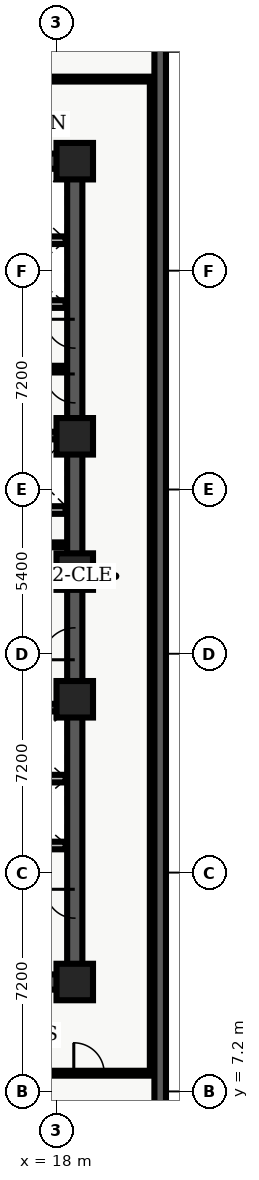
"""IFC4 building model, lengths in metres.
Left out: names, types, materials, properties, quantities, classifications, styles, units other than length and angle.
Written with IfcOpenShell. Run it as: python <this file> out.ifc"""

import sys

from ifc_helpers import new_model, entity, si_unit, converted_unit, direction, frame, origin_with_axes, origin_2d_with_axis, place, context, subcontext, project, spatial, polyline, rectangle, outline, extrude, element, fill, save


model = new_model("IFC4")
c1 = context("Model", 3, precision=1e-05, world=origin_with_axes(), true_north=direction((0.0, 1.0)))
c2 = subcontext(c1, "Body", "Model", "MODEL_VIEW")
j1 = project(units=[si_unit("LENGTHUNIT", "METRE"), converted_unit("PLANEANGLEUNIT", "DEGREE", entity("IfcPlaneAngleMeasure", 0.017), si_unit("PLANEANGLEUNIT", "RADIAN"), dimensions=[0, 0, 0, 0, 0, 0, 0])], contexts=[c1])
p1 = place(None, origin_with_axes())
s1 = spatial("IfcSite", under=j1, at=p1, CompositionType="ELEMENT")
p2 = place(p1, origin_with_axes())
s2 = spatial("IfcBuilding", under=s1, at=p2, CompositionType="ELEMENT")
p3 = place(p2, frame((0.0, 0.0, 93.0), z_axis=(0.0, 0.0, 1.0), x_axis=(1.0, 0.0, 0.0)))
s3 = spatial("IfcBuildingStorey", under=s2, at=p3, CompositionType="ELEMENT", Elevation=93.0)
p4 = place(p3, frame((11.4, 10.8, 0.0), z_axis=(0.0, 0.0, 1.0), x_axis=(1.0, 0.0, 0.0)))
e1 = element("IfcWall", 1, at=p4, inside=s3, PredefinedType="SHEAR", context=c2, shape_type="SweptSolid", body=[
    extrude(outline(polyline([(0.0, -0.25), (7.2, -0.25), (7.2, 0.25), (0.0, 0.25), (0.0, -0.25)])), origin_with_axes(), (0.0, 0.0, 1.0), 3.66),
])
p5 = place(p4, frame((2.625, 0.0, 0.0), z_axis=(0.0, 0.0, 1.0), x_axis=(1.0, 0.0, 0.0)))
e2 = element("IfcOpeningElement", 2, at=p5, cuts=e1, PredefinedType="OPENING", context=c2, shape_type="SweptSolid", body=[
    extrude(rectangle(XDim=1.05, YDim=0.52, at=origin_2d_with_axis()), origin_with_axes(), (0.0, 0.0, 1.0), 2.15),
])
p6 = place(p3, frame((11.4, 37.8, 0.0), z_axis=(0.0, 0.0, 1.0), x_axis=(1.0, 0.0, 0.0)))
e3 = element("IfcWall", 3, at=p6, inside=s3, PredefinedType="SHEAR", context=c2, shape_type="SweptSolid", body=[
    extrude(outline(polyline([(0.0, -0.25), (7.2, -0.25), (7.2, 0.25), (0.0, 0.25), (0.0, -0.25)])), origin_with_axes(), (0.0, 0.0, 1.0), 3.66),
])
p7 = place(p6, frame((2.625, 0.0, 0.0), z_axis=(0.0, 0.0, 1.0), x_axis=(1.0, 0.0, 0.0)))
e4 = element("IfcOpeningElement", 4, at=p7, cuts=e3, PredefinedType="OPENING", context=c2, shape_type="SweptSolid", body=[
    extrude(rectangle(XDim=1.05, YDim=0.52, at=origin_2d_with_axis()), origin_with_axes(), (0.0, 0.0, 1.0), 2.15),
])
p8 = place(p3, frame((18.6, 10.8, 0.0), z_axis=(0.0, 0.0, 1.0), x_axis=(0.0, 1.0, 0.0)))
e5 = element("IfcWall", 5, at=p8, inside=s3, PredefinedType="SHEAR", context=c2, shape_type="SweptSolid", body=[
    extrude(outline(polyline([(0.0, -0.25), (13.5, -0.25), (13.5, 0.25), (0.0, 0.25), (0.0, -0.25)])), origin_with_axes(), (0.0, 0.0, 1.0), 3.66),
])
p9 = place(p8, frame((11.125, 0.0, 0.0), z_axis=(0.0, 0.0, 1.0), x_axis=(1.0, 0.0, 0.0)))
e6 = element("IfcOpeningElement", 6, at=p9, cuts=e5, PredefinedType="OPENING", context=c2, shape_type="SweptSolid", body=[
    extrude(rectangle(XDim=1.05, YDim=0.52, at=origin_2d_with_axis()), origin_with_axes(), (0.0, 0.0, 1.0), 2.15),
])
p10 = place(p8, frame((2.575, 0.0, 0.0), z_axis=(0.0, 0.0, 1.0), x_axis=(1.0, 0.0, 0.0)))
e7 = element("IfcOpeningElement", 7, at=p10, cuts=e5, PredefinedType="OPENING", context=c2, shape_type="SweptSolid", body=[
    extrude(rectangle(XDim=0.95, YDim=0.52, at=origin_2d_with_axis()), origin_with_axes(), (0.0, 0.0, 1.0), 2.15),
])
p11 = place(p3, frame((18.6, 24.3, 0.0), z_axis=(0.0, 0.0, 1.0), x_axis=(0.0, 1.0, 0.0)))
e8 = element("IfcWall", 8, at=p11, inside=s3, PredefinedType="SHEAR", context=c2, shape_type="SweptSolid", body=[
    extrude(outline(polyline([(0.0, -0.25), (13.5, -0.25), (13.5, 0.25), (0.0, 0.25), (0.0, -0.25)])), origin_with_axes(), (0.0, 0.0, 1.0), 3.66),
])
p12 = place(p11, frame((6.025, 0.0, 0.0), z_axis=(0.0, 0.0, 1.0), x_axis=(1.0, 0.0, 0.0)))
e9 = element("IfcOpeningElement", 9, at=p12, cuts=e8, PredefinedType="OPENING", context=c2, shape_type="SweptSolid", body=[
    extrude(rectangle(XDim=0.95, YDim=0.52, at=origin_2d_with_axis()), origin_with_axes(), (0.0, 0.0, 1.0), 2.15),
])
p13 = place(p11, frame((7.825, 0.0, 0.0), z_axis=(0.0, 0.0, 1.0), x_axis=(1.0, 0.0, 0.0)))
e10 = element("IfcOpeningElement", 10, at=p13, cuts=e8, PredefinedType="OPENING", context=c2, shape_type="SweptSolid", body=[
    extrude(rectangle(XDim=0.95, YDim=0.52, at=origin_2d_with_axis()), origin_with_axes(), (0.0, 0.0, 1.0), 2.15),
])
for number, where, z_axis, x_axis in (
    (11, (11.65, 19.825, 0.0), (0.0, 0.0, 1.0), (1.0, 0.0, 0.0)),
    (12, (11.65, 28.775, 0.0), (0.0, 0.0, 1.0), (1.0, 0.0, 0.0)),
):
    element("IfcWall", number, at=place(p3, frame(where, z_axis=z_axis, x_axis=x_axis)), inside=s3, PredefinedType="SHEAR", context=c2, shape_type="SweptSolid", body=[
        extrude(outline(polyline([(0.0, -0.125), (6.7, -0.125), (6.7, 0.125), (0.0, 0.125), (0.0, -0.125)])), origin_with_axes(), (0.0, 0.0, 1.0), 3.66),
    ])
p14 = place(p3, frame((11.7, 24.1, 0.0), z_axis=(0.0, 0.0, 1.0), x_axis=(1.0, 0.0, 0.0)))
e13 = element("IfcWall", 13, at=p14, inside=s3, PredefinedType="SOLIDWALL", context=c2, shape_type="SweptSolid", body=[
    extrude(outline(polyline([(0.0, -0.125), (6.6, -0.125), (6.6, 0.125), (0.0, 0.125), (0.0, -0.125)])), origin_with_axes(), (0.0, 0.0, 1.0), 2.7),
])
p15 = place(p14, frame((3.75, 0.0, 0.0), z_axis=(0.0, 0.0, 1.0), x_axis=(1.0, 0.0, 0.0)))
e14 = element("IfcOpeningElement", 14, at=p15, cuts=e13, PredefinedType="OPENING", context=c2, shape_type="SweptSolid", body=[
    extrude(rectangle(XDim=0.9, YDim=0.27, at=origin_2d_with_axis()), origin_with_axes(), (0.0, 0.0, 1.0), 2.15),
])
p16 = place(p3, frame((11.7, 26.325, 0.0), z_axis=(0.0, 0.0, 1.0), x_axis=(1.0, 0.0, 0.0)))
e15 = element("IfcWall", 15, at=p16, inside=s3, PredefinedType="SOLIDWALL", context=c2, shape_type="SweptSolid", body=[
    extrude(outline(polyline([(0.0, -0.125), (6.6, -0.125), (6.6, 0.125), (0.0, 0.125), (0.0, -0.125)])), origin_with_axes(), (0.0, 0.0, 1.0), 2.7),
])
p17 = place(p16, frame((3.5, 0.0, 0.0), z_axis=(0.0, 0.0, 1.0), x_axis=(1.0, 0.0, 0.0)))
e16 = element("IfcOpeningElement", 16, at=p17, cuts=e15, PredefinedType="OPENING", context=c2, shape_type="SweptSolid", body=[
    extrude(rectangle(XDim=0.9, YDim=0.27, at=origin_2d_with_axis()), origin_with_axes(), (0.0, 0.0, 1.0), 2.15),
])
for number, where, z_axis, x_axis in (
    (17, (18.6, 10.8, 0.0), (0.0, 0.0, 1.0), (1.0, 0.0, 0.0)),
    (18, (18.6, 20.1, 0.0), (0.0, 0.0, 1.0), (1.0, 0.0, 0.0)),
    (19, (18.6, 24.3, 0.0), (0.0, 0.0, 1.0), (1.0, 0.0, 0.0)),
    (20, (18.6, 28.75, 0.0), (0.0, 0.0, 1.0), (1.0, 0.0, 0.0)),
    (21, (18.6, 37.8, 0.0), (0.0, 0.0, 1.0), (1.0, 0.0, 0.0)),
):
    element("IfcColumn", number, at=place(p3, frame(where, z_axis=z_axis, x_axis=x_axis)), inside=s3, PredefinedType="COLUMN", context=c2, shape_type="SweptSolid", body=[
        extrude(rectangle(XDim=1.2, YDim=1.2, at=origin_2d_with_axis()), origin_with_axes(), (0.0, 0.0, 1.0), 3.9),
    ])
p18 = place(p3, frame((14.62, 25.18, 0.0), z_axis=(0.0, 0.0, 1.0), x_axis=(1.0, 0.0, 0.0)))
e22 = element("IfcWall", 22, at=p18, inside=s3, PredefinedType="PARTITIONING", context=c2, shape_type="SweptSolid", body=[
    extrude(outline(polyline([(0.0, -0.08), (3.68, -0.08), (3.68, 0.08), (0.0, 0.08), (0.0, -0.08)])), origin_with_axes(), (0.0, 0.0, 1.0), 2.7),
])
p19 = place(p18, frame((1.95, 0.0, 0.0), z_axis=(0.0, 0.0, 1.0), x_axis=(1.0, 0.0, 0.0)))
e23 = element("IfcOpeningElement", 23, at=p19, cuts=e22, PredefinedType="OPENING", context=c2, shape_type="SweptSolid", body=[
    extrude(rectangle(XDim=0.9, YDim=0.18, at=origin_2d_with_axis()), origin_with_axes(), (0.0, 0.0, 1.0), 2.15),
])
for number, where, z_axis, x_axis in (
    (24, (15.84, 15.29, 0.0), (0.0, 0.0, 1.0), (1.0, 0.0, 0.0)),
    (25, (15.84, 17.49, 0.0), (0.0, 0.0, 1.0), (1.0, 0.0, 0.0)),
    (26, (15.84, 33.1, 0.0), (0.0, 0.0, 1.0), (1.0, 0.0, 0.0)),
    (27, (15.84, 35.2, 0.0), (0.0, 0.0, 1.0), (1.0, 0.0, 0.0)),
):
    element("IfcWall", number, at=place(p3, frame(where, z_axis=z_axis, x_axis=x_axis)), inside=s3, PredefinedType="SOLIDWALL", context=c2, shape_type="SweptSolid", body=[
        extrude(outline(polyline([(0.0, -0.125), (2.46, -0.125), (2.46, 0.125), (0.0, 0.125), (0.0, -0.125)])), origin_with_axes(), (0.0, 0.0, 1.0), 2.7),
    ])
p20 = place(p3, frame((15.84, 31.0, 0.0), z_axis=(0.0, 0.0, 1.0), x_axis=(1.0, 0.0, 0.0)))
e28 = element("IfcWall", 28, at=p20, inside=s3, PredefinedType="PARTITIONING", context=c2, shape_type="SweptSolid", body=[
    extrude(outline(polyline([(0.0, -0.07), (2.46, -0.07), (2.46, 0.07), (0.0, 0.07), (0.0, -0.07)])), origin_with_axes(), (0.0, 0.0, 1.0), 2.7),
])
p21 = place(p3, frame((2.6, 7.8, 0.0), z_axis=(0.0, 0.0, 1.0), x_axis=(1.0, 0.0, 0.0)))
e29 = element("IfcWall", 29, at=p21, inside=s3, PredefinedType="PARTITIONING", context=c2, shape_type="SweptSolid", body=[
    extrude(outline(polyline([(0.0, -0.08), (18.625, -0.08), (18.625, 0.08), (0.0, 0.08), (0.0, -0.08)])), origin_with_axes(), (0.0, 0.0, 1.0), 2.7),
])
p22 = place(p21, frame((2.42, 0.0, 0.0), z_axis=(0.0, 0.0, 1.0), x_axis=(1.0, 0.0, 0.0)))
e30 = element("IfcOpeningElement", 30, at=p22, cuts=e29, PredefinedType="OPENING", context=c2, shape_type="SweptSolid", body=[
    extrude(rectangle(XDim=1.0, YDim=0.18, at=origin_2d_with_axis()), origin_with_axes(), (0.0, 0.0, 1.0), 2.15),
])
p23 = place(p21, frame((10.523, 0.0, 0.0), z_axis=(0.0, 0.0, 1.0), x_axis=(1.0, 0.0, 0.0)))
e31 = element("IfcOpeningElement", 31, at=p23, cuts=e29, PredefinedType="OPENING", context=c2, shape_type="SweptSolid", body=[
    extrude(rectangle(XDim=1.2, YDim=0.18, at=origin_2d_with_axis()), origin_with_axes(), (0.0, 0.0, 1.0), 2.2),
])
p24 = place(p21, frame((16.468, 0.0, 0.0), z_axis=(0.0, 0.0, 1.0), x_axis=(1.0, 0.0, 0.0)))
e32 = element("IfcOpeningElement", 32, at=p24, cuts=e29, PredefinedType="OPENING", context=c2, shape_type="SweptSolid", body=[
    extrude(rectangle(XDim=1.0, YDim=0.18, at=origin_2d_with_axis()), origin_with_axes(), (0.0, 0.0, 1.0), 2.15),
])
p25 = place(p3, frame((2.6, 40.5, 0.0), z_axis=(0.0, 0.0, 1.0), x_axis=(1.0, 0.0, 0.0)))
e33 = element("IfcWall", 33, at=p25, inside=s3, PredefinedType="PARTITIONING", context=c2, shape_type="SweptSolid", body=[
    extrude(outline(polyline([(0.0, -0.08), (18.65, -0.08), (18.65, 0.08), (0.0, 0.08), (0.0, -0.08)])), origin_with_axes(), (0.0, 0.0, 1.0), 2.7),
])
p26 = place(p25, frame((5.275, 0.0, 0.0), z_axis=(0.0, 0.0, 1.0), x_axis=(1.0, 0.0, 0.0)))
e34 = element("IfcOpeningElement", 34, at=p26, cuts=e33, PredefinedType="OPENING", context=c2, shape_type="SweptSolid", body=[
    extrude(rectangle(XDim=1.0, YDim=0.18, at=origin_2d_with_axis()), origin_with_axes(), (0.0, 0.0, 1.0), 2.15),
])
p27 = place(p25, frame((12.61, 0.0, 0.0), z_axis=(0.0, 0.0, 1.0), x_axis=(1.0, 0.0, 0.0)))
e35 = element("IfcOpeningElement", 35, at=p27, cuts=e33, PredefinedType="OPENING", context=c2, shape_type="SweptSolid", body=[
    extrude(rectangle(XDim=1.2, YDim=0.18, at=origin_2d_with_axis()), origin_with_axes(), (0.0, 0.0, 1.0), 2.2),
])
p28 = place(p3, frame((21.15, 7.8, 0.0), z_axis=(0.0, 0.0, 1.0), x_axis=(0.0, 1.0, 0.0)))
e36 = element("IfcWall", 36, at=p28, inside=s3, PredefinedType="PARTITIONING", context=c2, shape_type="SweptSolid", body=[
    extrude(outline(polyline([(0.0, -0.08), (32.7, -0.08), (32.7, 0.08), (0.0, 0.08), (0.0, -0.08)])), origin_with_axes(), (0.0, 0.0, 1.0), 2.7),
])
p29 = place(p3, frame((21.41, 45.82, 0.0), z_axis=(0.0, 0.0, 1.0), x_axis=(0.0, -1.0, 0.0)))
e37 = element("IfcWall", 37, at=p29, inside=s3, PredefinedType="SOLIDWALL", context=c2, shape_type="SweptSolid", body=[
    extrude(outline(polyline([(0.0, -0.19), (45.82, -0.19), (45.82, 0.19), (0.0, 0.19), (0.0, -0.19)])), origin_with_axes(), (0.0, 0.0, 1.0), 3.66),
])
p30 = place(p29, frame((3.079, 0.0, 0.45), z_axis=(0.0, 0.0, 1.0), x_axis=(1.0, 0.0, 0.0)))
e38 = element("IfcOpeningElement", 38, at=p30, cuts=e37, PredefinedType="OPENING", context=c2, shape_type="SweptSolid", body=[
    extrude(rectangle(XDim=2.1, YDim=0.4, at=origin_2d_with_axis()), origin_with_axes(), (0.0, 0.0, 1.0), 2.2),
])
p31 = place(p29, frame((42.741, 0.0, 0.45), z_axis=(0.0, 0.0, 1.0), x_axis=(1.0, 0.0, 0.0)))
e39 = element("IfcOpeningElement", 39, at=p31, cuts=e37, PredefinedType="OPENING", context=c2, shape_type="SweptSolid", body=[
    extrude(rectangle(XDim=2.1, YDim=0.4, at=origin_2d_with_axis()), origin_with_axes(), (0.0, 0.0, 1.0), 2.2),
])
p32 = place(p8, frame((11.125, 0.0, 0.0), z_axis=(0.0, 0.0, 1.0), x_axis=(1.0, 0.0, 0.0)))
e40 = element("IfcDoor", 40, at=p32, inside=s3, OperationType="SINGLE_SWING_LEFT", PredefinedType="DOOR", context=c2, shape_type="SweptSolid", body=[
    extrude(rectangle(XDim=1.05, YDim=0.09, at=origin_2d_with_axis()), origin_with_axes(), (0.0, 0.0, 1.0), 2.15),
])
fill(e6, e40)
p33 = place(p8, frame((2.575, 0.0, 0.0), z_axis=(0.0, 0.0, 1.0), x_axis=(1.0, 0.0, 0.0)))
e41 = element("IfcDoor", 41, at=p33, inside=s3, OperationType="SINGLE_SWING_RIGHT", PredefinedType="DOOR", context=c2, shape_type="SweptSolid", body=[
    extrude(rectangle(XDim=0.95, YDim=0.09, at=origin_2d_with_axis()), origin_with_axes(), (0.0, 0.0, 1.0), 2.15),
])
fill(e7, e41)
p34 = place(p11, frame((6.025, 0.0, 0.0), z_axis=(0.0, 0.0, 1.0), x_axis=(1.0, 0.0, 0.0)))
e42 = element("IfcDoor", 42, at=p34, inside=s3, OperationType="SINGLE_SWING_RIGHT", PredefinedType="DOOR", context=c2, shape_type="SweptSolid", body=[
    extrude(rectangle(XDim=0.95, YDim=0.09, at=origin_2d_with_axis()), origin_with_axes(), (0.0, 0.0, 1.0), 2.15),
])
fill(e9, e42)
p35 = place(p11, frame((7.825, 0.0, 0.0), z_axis=(0.0, 0.0, 1.0), x_axis=(1.0, 0.0, 0.0)))
e43 = element("IfcDoor", 43, at=p35, inside=s3, OperationType="SINGLE_SWING_RIGHT", PredefinedType="DOOR", context=c2, shape_type="SweptSolid", body=[
    extrude(rectangle(XDim=0.95, YDim=0.09, at=origin_2d_with_axis()), origin_with_axes(), (0.0, 0.0, 1.0), 2.15),
])
fill(e10, e43)
p36 = place(p21, frame((16.468, 0.0, 0.0), z_axis=(0.0, 0.0, 1.0), x_axis=(1.0, 0.0, 0.0)))
e44 = element("IfcDoor", 44, at=p36, inside=s3, OperationType="SINGLE_SWING_LEFT", PredefinedType="DOOR", context=c2, shape_type="SweptSolid", body=[
    extrude(rectangle(XDim=1.0, YDim=0.09, at=origin_2d_with_axis()), origin_with_axes(), (0.0, 0.0, 1.0), 2.15),
])
fill(e32, e44)
save(model, sys.argv[1])
